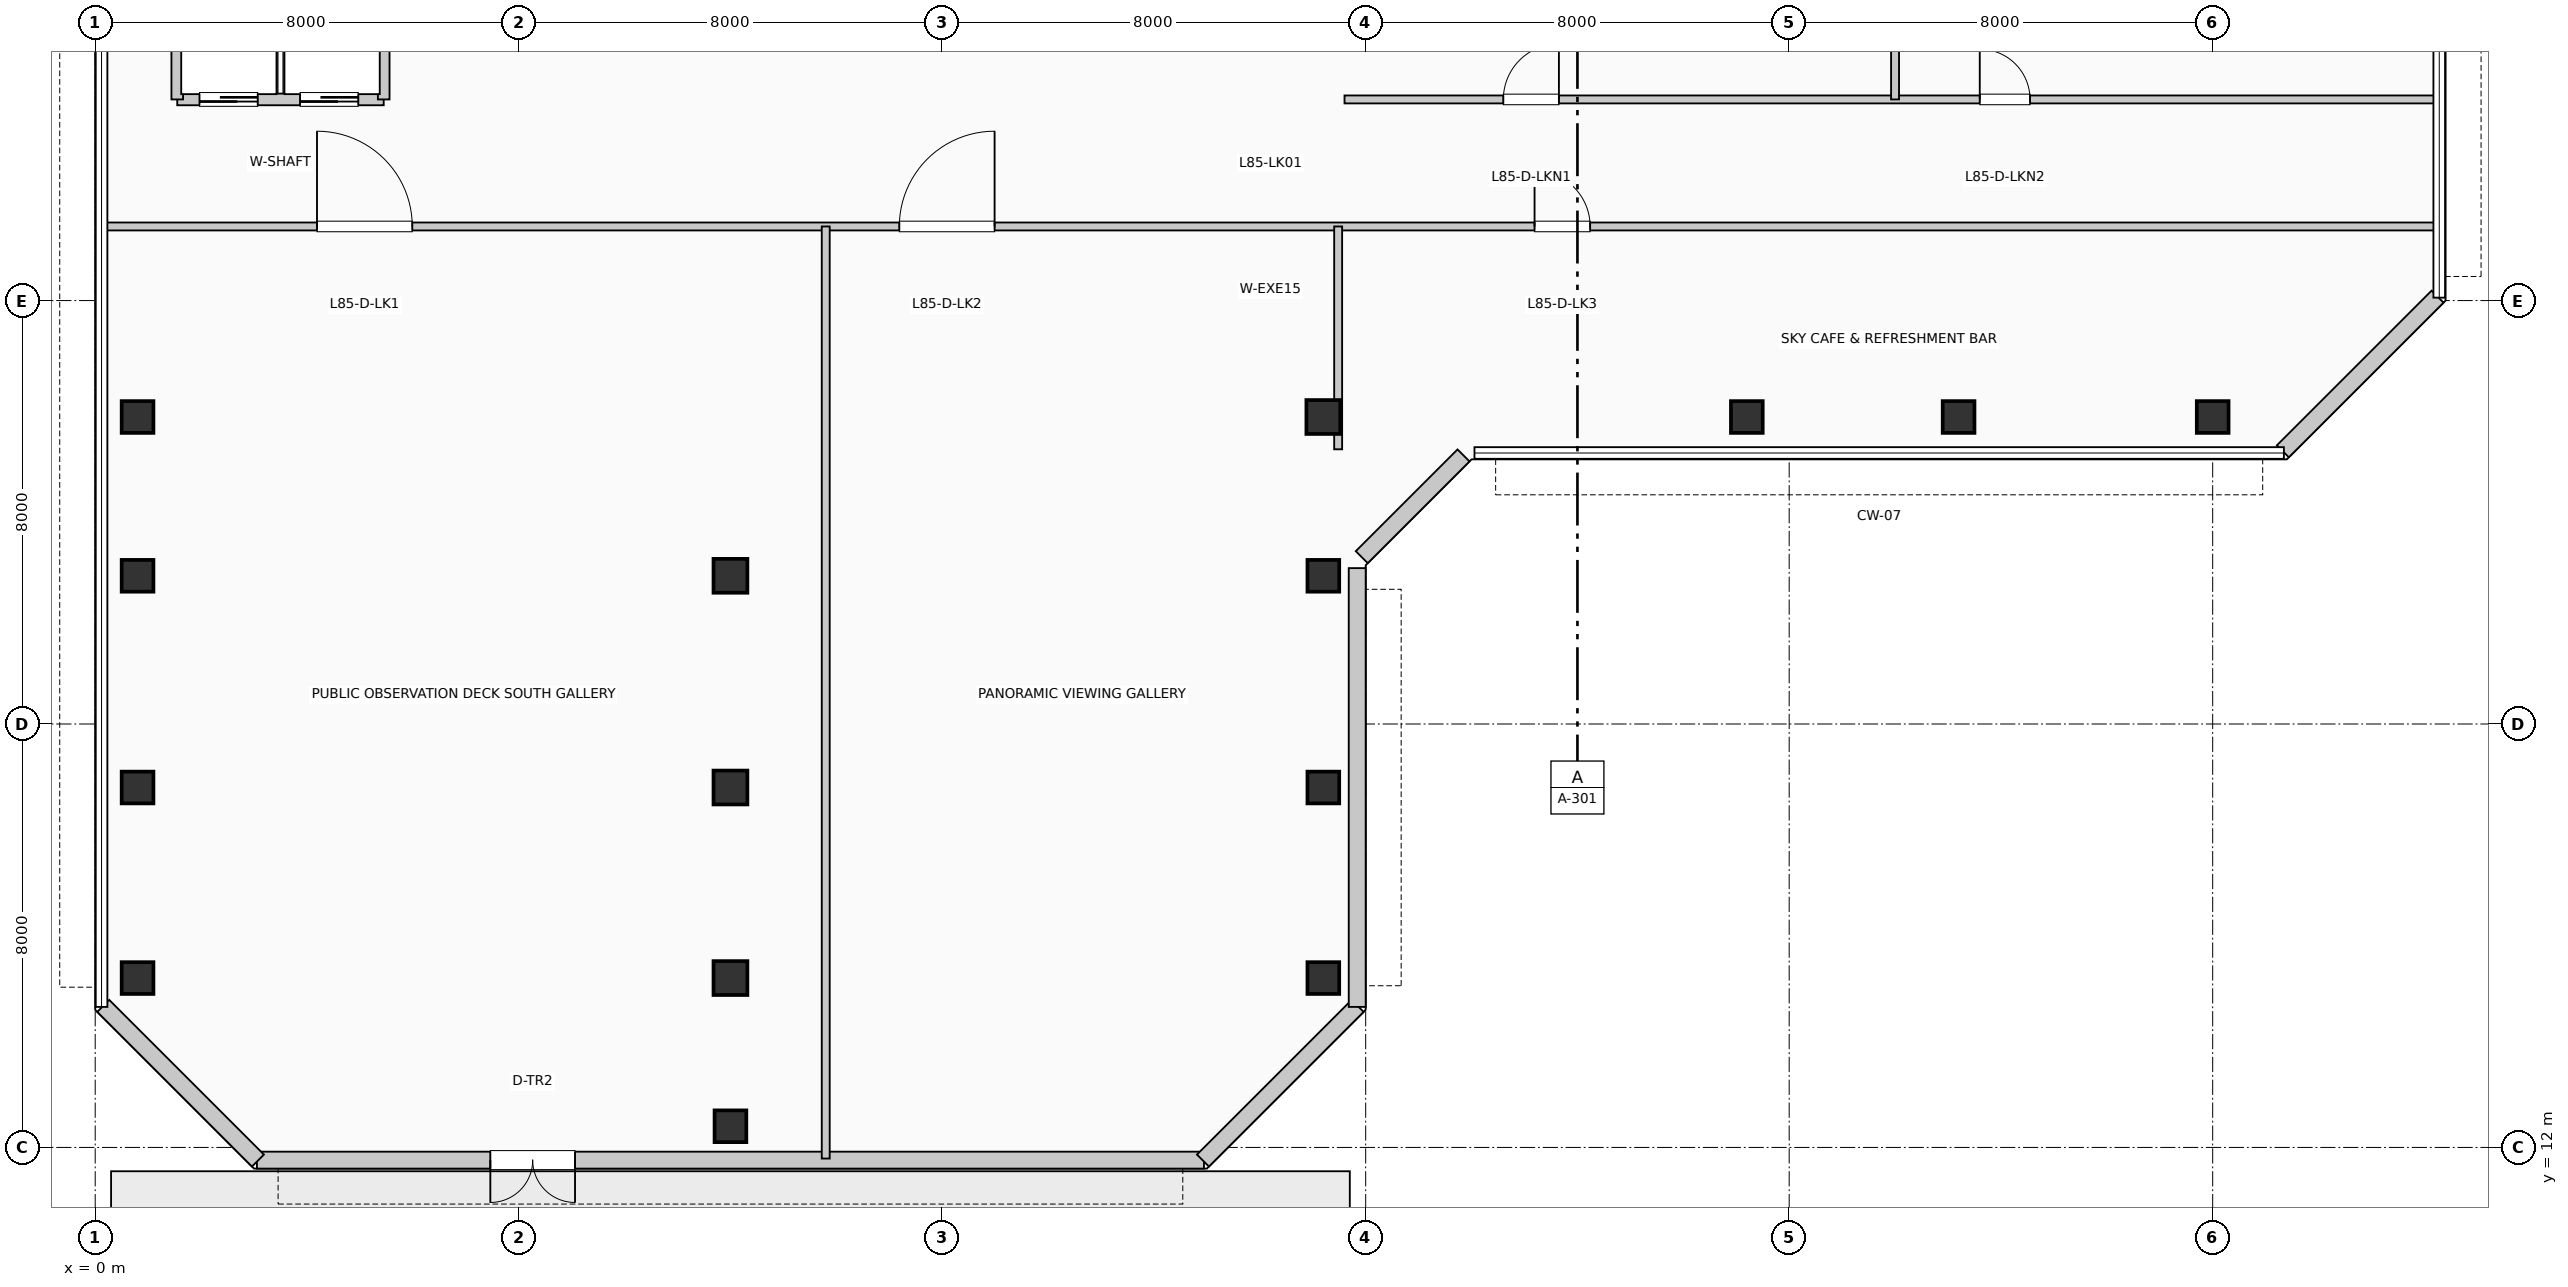
"""IFC4 building model, lengths in metres.
Left out: names, types, materials, properties, quantities, classifications, styles, units other than length and angle.
Written with IfcOpenShell. Run it as: python <this file> out.ifc"""

import sys

from ifc_helpers import new_model, si_unit, direction, frame, frame_2d, origin, origin_2d, place, context, subcontext, project, spatial, rectangle, extrude, element, fill, save


model = new_model("IFC4")
c1 = context("Model", 3, precision=1e-05, world=origin(), true_north=direction((0.0, 1.0)))
c2 = subcontext(c1, "Body", "Model", "MODEL_VIEW")
j1 = project(units=[si_unit("LENGTHUNIT", "METRE"), si_unit("PLANEANGLEUNIT", "RADIAN")], contexts=[c1])
p1 = place(None, origin())
s1 = spatial("IfcSite", under=j1, at=p1, CompositionType="ELEMENT")
p2 = place(p1, origin())
s2 = spatial("IfcBuilding", under=s1, at=p2, CompositionType="ELEMENT")
p3 = place(p2, frame((0.0, 0.0, 347.49)))
s3 = spatial("IfcBuildingStorey", under=s2, at=p3, CompositionType="ELEMENT", Elevation=347.49)
for number, where, z_axis, x_axis in (
    (1, (0.8, 15.2, 0.0), (0.0, 0.0, 1.0), (1.0, 0.0, 0.0)),
    (2, (0.8, 18.8, 0.0), (0.0, 0.0, 1.0), (1.0, 0.0, 0.0)),
    (3, (0.8, 22.8, 0.0), (0.0, 0.0, 1.0), (1.0, 0.0, 0.0)),
    (4, (0.8, 25.8, 0.0), (0.0, 0.0, 1.0), (1.0, 0.0, 0.0)),
    (5, (12.0, 12.4, 0.0), (0.0, 0.0, 1.0), (1.0, 0.0, 0.0)),
):
    element("IfcColumn", number, at=place(p3, frame(where, z_axis=z_axis, x_axis=x_axis)), inside=s3, PredefinedType="COLUMN", context=c2, shape_type="SweptSolid", body=[
        extrude(rectangle(XDim=0.6, YDim=0.6, at=origin_2d()), origin(), (0.0, 0.0, 1.0), 4.62),
    ])
for number, where, z_axis, x_axis in (
    (6, (12.0, 15.2, 0.0), (0.0, 0.0, 1.0), (1.0, 0.0, 0.0)),
    (7, (12.0, 18.8, 0.0), (0.0, 0.0, 1.0), (1.0, 0.0, 0.0)),
    (8, (12.0, 22.8, 0.0), (0.0, 0.0, 1.0), (1.0, 0.0, 0.0)),
):
    element("IfcColumn", number, at=place(p3, frame(where, z_axis=z_axis, x_axis=x_axis)), inside=s3, PredefinedType="COLUMN", context=c2, shape_type="SweptSolid", body=[
        extrude(rectangle(XDim=0.64, YDim=0.64, at=origin_2d()), origin(), (0.0, 0.0, 1.0), 4.62),
    ])
for number, where, z_axis, x_axis in (
    (9, (23.2, 15.2, 0.0), (0.0, 0.0, 1.0), (1.0, 0.0, 0.0)),
    (10, (23.2, 18.8, 0.0), (0.0, 0.0, 1.0), (1.0, 0.0, 0.0)),
    (11, (23.2, 22.8, 0.0), (0.0, 0.0, 1.0), (1.0, 0.0, 0.0)),
):
    element("IfcColumn", number, at=place(p3, frame(where, z_axis=z_axis, x_axis=x_axis)), inside=s3, PredefinedType="COLUMN", context=c2, shape_type="SweptSolid", body=[
        extrude(rectangle(XDim=0.6, YDim=0.6, at=origin_2d()), origin(), (0.0, 0.0, 1.0), 4.62),
    ])
p4 = place(p3, frame((23.2, 25.8, 0.0), z_axis=(0.0, 0.0, 1.0), x_axis=(1.0, 0.0, 0.0)))
e12 = element("IfcColumn", 12, at=p4, inside=s3, PredefinedType="COLUMN", context=c2, shape_type="SweptSolid", body=[
    extrude(rectangle(XDim=0.64, YDim=0.64, at=origin_2d()), origin(), (0.0, 0.0, 1.0), 4.62),
])
for number, where, z_axis, x_axis in (
    (13, (31.2, 25.8, 0.0), (0.0, 0.0, 1.0), (1.0, 0.0, 0.0)),
    (14, (35.2, 25.8, 0.0), (0.0, 0.0, 1.0), (1.0, 0.0, 0.0)),
    (15, (40.0, 25.8, 0.0), (0.0, 0.0, 1.0), (1.0, 0.0, 0.0)),
):
    element("IfcColumn", number, at=place(p3, frame(where, z_axis=z_axis, x_axis=x_axis)), inside=s3, PredefinedType="COLUMN", context=c2, shape_type="SweptSolid", body=[
        extrude(rectangle(XDim=0.6, YDim=0.6, at=origin_2d()), origin(), (0.0, 0.0, 1.0), 4.62),
    ])
p5 = place(p3, frame((3.055, 11.76, 0.0), z_axis=(0.0, 0.0, 1.0), x_axis=(1.0, 0.0, 0.0)))
e16 = element("IfcWall", 16, at=p5, inside=s3, PredefinedType="SOLIDWALL", context=c2, shape_type="SweptSolid", body=[
    extrude(rectangle(XDim=17.89, YDim=0.32, at=frame_2d((8.945, 0.0))), origin(), (0.0, 0.0, 1.0), 4.37),
])
p6 = place(p5, frame((6.009, 0.0, 0.0), z_axis=(0.0, 0.0, 1.0), x_axis=(-1.0, 0.0, 0.0)))
e17 = element("IfcOpeningElement", 17, at=p6, cuts=e16, PredefinedType="OPENING", context=c2, shape_type="SweptSolid", body=[
    extrude(rectangle(XDim=1.6, YDim=2.25, at=frame_2d((0.8, 1.125))), frame((0.0, 0.17, 0.0), z_axis=(0.0, -1.0, 0.0), x_axis=(1.0, 0.0, 0.0)), (0.0, 0.0, 1.0), 0.34),
])
p7 = place(p3, frame((20.926, 11.752, 0.0), z_axis=(0.0, 0.0, 1.0), x_axis=(0.707077242712, 0.707136318428, 0.0)))
e18 = element("IfcWall", 18, at=p7, inside=s3, PredefinedType="SOLIDWALL", context=c2, shape_type="SweptSolid", body=[
    extrude(rectangle(XDim=4.133, YDim=0.32, at=frame_2d((2.066, 0.0))), origin(), (0.0, 0.0, 1.0), 4.37),
])
p8 = place(p3, frame((23.84, 14.655, 0.0), z_axis=(0.0, 0.0, 1.0), x_axis=(0.0, 1.0, 0.0)))
e19 = element("IfcWall", 19, at=p8, inside=s3, PredefinedType="SOLIDWALL", context=c2, shape_type="SweptSolid", body=[
    extrude(rectangle(XDim=8.29, YDim=0.32, at=frame_2d((4.145, 0.0))), origin(), (0.0, 0.0, 1.0), 4.37),
])
p9 = place(p3, frame((23.926, 23.152, 0.0), z_axis=(0.0, 0.0, 1.0), x_axis=(0.707106781187, 0.707106781187, 0.0)))
e20 = element("IfcWall", 20, at=p9, inside=s3, PredefinedType="SOLIDWALL", context=c2, shape_type="SweptSolid", body=[
    extrude(rectangle(XDim=2.718, YDim=0.32, at=frame_2d((1.359, 0.0))), origin(), (0.0, 0.0, 1.0), 4.37),
])
for number, where, z_axis, x_axis in (
    (21, (41.326, 25.152, 0.0), (0.0, 0.0, 1.0), (0.707, 0.707, 0.0)),
    (22, (0.152, 14.674, 0.0), (0.0, 0.0, 1.0), (0.707, -0.707, 0.0)),
):
    element("IfcWall", number, at=place(p3, frame(where, z_axis=z_axis, x_axis=x_axis)), inside=s3, PredefinedType="SOLIDWALL", context=c2, shape_type="SweptSolid", body=[
        extrude(rectangle(XDim=4.133, YDim=0.32, at=frame_2d((2.066, 0.0))), origin(), (0.0, 0.0, 1.0), 4.37),
    ])
p10 = place(p3, frame((1.55, 31.8, 0.0), z_axis=(0.0, 0.0, 1.0), x_axis=(1.0, 0.0, 0.0)))
e23 = element("IfcWall", 23, at=p10, inside=s3, PredefinedType="PARTITIONING", context=c2, shape_type="SweptSolid", body=[
    extrude(rectangle(XDim=3.9, YDim=0.22, at=frame_2d((1.95, 0.0))), origin(), (0.0, 0.0, 1.0), 4.37),
])
p11 = place(p10, frame((1.52, 0.0, 0.0), z_axis=(0.0, 0.0, 1.0), x_axis=(-1.0, 0.0, 0.0)))
e24 = element("IfcOpeningElement", 24, at=p11, cuts=e23, PredefinedType="OPENING", context=c2, shape_type="SweptSolid", body=[
    extrude(rectangle(XDim=1.1, YDim=2.2, at=frame_2d((0.55, 1.1))), frame((0.0, 0.12, 0.0), z_axis=(0.0, -1.0, 0.0), x_axis=(1.0, 0.0, 0.0)), (0.0, 0.0, 1.0), 0.24),
])
p12 = place(p10, frame((3.42, 0.0, 0.0), z_axis=(0.0, 0.0, 1.0), x_axis=(-1.0, 0.0, 0.0)))
e25 = element("IfcOpeningElement", 25, at=p12, cuts=e23, PredefinedType="OPENING", context=c2, shape_type="SweptSolid", body=[
    extrude(rectangle(XDim=1.1, YDim=2.2, at=frame_2d((0.55, 1.1))), frame((0.0, 0.12, 0.0), z_axis=(0.0, -1.0, 0.0), x_axis=(1.0, 0.0, 0.0)), (0.0, 0.0, 1.0), 0.24),
])
for number, where, z_axis, x_axis in (
    (26, (1.55, 31.8, 0.0), (0.0, 0.0, 1.0), (0.0, 1.0, 0.0)),
    (27, (5.45, 31.8, 0.0), (0.0, 0.0, 1.0), (0.0, 1.0, 0.0)),
):
    element("IfcWall", number, at=place(p3, frame(where, z_axis=z_axis, x_axis=x_axis)), inside=s3, PredefinedType="PARTITIONING", context=c2, shape_type="SweptSolid", body=[
        extrude(rectangle(XDim=2.38, YDim=0.22, at=frame_2d((1.19, 0.0))), origin(), (0.0, 0.0, 1.0), 4.37),
    ])
p13 = place(p3, frame((0.19, 29.4, 0.0), z_axis=(0.0, 0.0, 1.0), x_axis=(1.0, 0.0, 0.0)))
e28 = element("IfcWall", 28, at=p13, inside=s3, PredefinedType="PARTITIONING", context=c2, shape_type="SweptSolid", body=[
    extrude(rectangle(XDim=44.02, YDim=0.15, at=frame_2d((22.01, 0.0))), origin(), (0.0, 0.0, 1.0), 4.055),
])
p14 = place(p13, frame((4.0, 0.0, 0.0)))
e29 = element("IfcOpeningElement", 29, at=p14, cuts=e28, PredefinedType="OPENING", context=c2, shape_type="SweptSolid", body=[
    extrude(rectangle(XDim=1.8, YDim=2.3, at=frame_2d((0.9, 1.15))), frame((0.0, 0.085, 0.0), z_axis=(0.0, -1.0, 0.0), x_axis=(1.0, 0.0, 0.0)), (0.0, 0.0, 1.0), 0.17),
])
p15 = place(p13, frame((15.0, 0.0, 0.0)))
e30 = element("IfcOpeningElement", 30, at=p15, cuts=e28, PredefinedType="OPENING", context=c2, shape_type="SweptSolid", body=[
    extrude(rectangle(XDim=1.8, YDim=2.3, at=frame_2d((0.9, 1.15))), frame((0.0, 0.085, 0.0), z_axis=(0.0, -1.0, 0.0), x_axis=(1.0, 0.0, 0.0)), (0.0, 0.0, 1.0), 0.17),
])
p16 = place(p13, frame((27.0, 0.0, 0.0)))
e31 = element("IfcOpeningElement", 31, at=p16, cuts=e28, PredefinedType="OPENING", context=c2, shape_type="SweptSolid", body=[
    extrude(rectangle(XDim=1.05, YDim=2.15, at=frame_2d((0.525, 1.075))), frame((0.0, 0.085, 0.0), z_axis=(0.0, -1.0, 0.0), x_axis=(1.0, 0.0, 0.0)), (0.0, 0.0, 1.0), 0.17),
])
p17 = place(p3, frame((23.6, 31.8, 0.0), z_axis=(0.0, 0.0, 1.0), x_axis=(1.0, 0.0, 0.0)))
e32 = element("IfcWall", 32, at=p17, inside=s3, PredefinedType="PARTITIONING", context=c2, shape_type="SweptSolid", body=[
    extrude(rectangle(XDim=20.61, YDim=0.15, at=frame_2d((10.305, 0.0))), origin(), (0.0, 0.0, 1.0), 4.37),
])
p18 = place(p17, frame((3.0, 0.0, 0.0)))
e33 = element("IfcOpeningElement", 33, at=p18, cuts=e32, PredefinedType="OPENING", context=c2, shape_type="SweptSolid", body=[
    extrude(rectangle(XDim=1.05, YDim=2.15, at=frame_2d((0.525, 1.075))), frame((0.0, 0.085, 0.0), z_axis=(0.0, -1.0, 0.0), x_axis=(1.0, 0.0, 0.0)), (0.0, 0.0, 1.0), 0.17),
])
p19 = place(p17, frame((12.0, 0.0, 0.0)))
e34 = element("IfcOpeningElement", 34, at=p19, cuts=e32, PredefinedType="OPENING", context=c2, shape_type="SweptSolid", body=[
    extrude(rectangle(XDim=0.95, YDim=2.15, at=frame_2d((0.475, 1.075))), frame((0.0, 0.085, 0.0), z_axis=(0.0, -1.0, 0.0), x_axis=(1.0, 0.0, 0.0)), (0.0, 0.0, 1.0), 0.17),
])
p20 = place(p3, frame((13.8, 11.79, 0.0), z_axis=(0.0, 0.0, 1.0), x_axis=(0.0, 1.0, 0.0)))
e35 = element("IfcWall", 35, at=p20, inside=s3, PredefinedType="PARTITIONING", context=c2, shape_type="SweptSolid", body=[
    extrude(rectangle(XDim=17.61, YDim=0.15, at=frame_2d((8.805, 0.0))), origin(), (0.0, 0.0, 1.0), 4.37),
])
p21 = place(p3, frame((23.48, 25.19, 0.0), z_axis=(0.0, 0.0, 1.0), x_axis=(0.0, 1.0, 0.0)))
e36 = element("IfcWall", 36, at=p21, inside=s3, PredefinedType="PARTITIONING", context=c2, shape_type="SweptSolid", body=[
    extrude(rectangle(XDim=4.21, YDim=0.15, at=frame_2d((2.105, 0.0))), origin(), (0.0, 0.0, 1.0), 3.855),
])
p22 = place(p3, frame((34.0, 31.8, 0.0), z_axis=(0.0, 0.0, 1.0), x_axis=(0.0, 1.0, 0.0)))
e37 = element("IfcWall", 37, at=p22, inside=s3, PredefinedType="PARTITIONING", context=c2, shape_type="SweptSolid", body=[
    extrude(rectangle(XDim=14.01, YDim=0.15, at=frame_2d((7.005, 0.0))), origin(), (0.0, 0.0, 1.0), 4.37),
])
p23 = place(p6, origin())
e38 = element("IfcDoor", 38, at=p23, inside=s3, OperationType="DOUBLE_DOOR_SINGLE_SWING", PredefinedType="DOOR", context=c2, shape_type="SweptSolid", body=[
    extrude(rectangle(XDim=1.6, YDim=2.25, at=frame_2d((0.8, 1.125))), frame((0.0, 0.025, 0.0), z_axis=(0.0, -1.0, 0.0), x_axis=(1.0, 0.0, 0.0)), (0.0, 0.0, 1.0), 0.05),
])
fill(e17, e38)
p24 = place(p11, origin())
e39 = element("IfcDoor", 39, at=p24, inside=s3, OperationType="SLIDING_TO_LEFT", PredefinedType="DOOR", context=c2, shape_type="SweptSolid", body=[
    extrude(rectangle(XDim=1.1, YDim=2.2, at=frame_2d((0.55, 1.1))), frame((0.0, 0.025, 0.0), z_axis=(0.0, -1.0, 0.0), x_axis=(1.0, 0.0, 0.0)), (0.0, 0.0, 1.0), 0.05),
])
fill(e24, e39)
p25 = place(p12, origin())
e40 = element("IfcDoor", 40, at=p25, inside=s3, OperationType="SLIDING_TO_LEFT", PredefinedType="DOOR", context=c2, shape_type="SweptSolid", body=[
    extrude(rectangle(XDim=1.1, YDim=2.2, at=frame_2d((0.55, 1.1))), frame((0.0, 0.025, 0.0), z_axis=(0.0, -1.0, 0.0), x_axis=(1.0, 0.0, 0.0)), (0.0, 0.0, 1.0), 0.05),
])
fill(e25, e40)
p26 = place(p14, origin())
e41 = element("IfcDoor", 41, at=p26, inside=s3, OperationType="SINGLE_SWING_LEFT", PredefinedType="DOOR", context=c2, shape_type="SweptSolid", body=[
    extrude(rectangle(XDim=1.8, YDim=2.3, at=frame_2d((0.9, 1.15))), frame((0.0, 0.025, 0.0), z_axis=(0.0, -1.0, 0.0), x_axis=(1.0, 0.0, 0.0)), (0.0, 0.0, 1.0), 0.05),
])
fill(e29, e41)
p27 = place(p15, origin())
e42 = element("IfcDoor", 42, at=p27, inside=s3, OperationType="SINGLE_SWING_RIGHT", PredefinedType="DOOR", context=c2, shape_type="SweptSolid", body=[
    extrude(rectangle(XDim=1.8, YDim=2.3, at=frame_2d((0.9, 1.15))), frame((0.0, 0.025, 0.0), z_axis=(0.0, -1.0, 0.0), x_axis=(1.0, 0.0, 0.0)), (0.0, 0.0, 1.0), 0.05),
])
fill(e30, e42)
p28 = place(p16, origin())
e43 = element("IfcDoor", 43, at=p28, inside=s3, OperationType="SINGLE_SWING_LEFT", PredefinedType="DOOR", context=c2, shape_type="SweptSolid", body=[
    extrude(rectangle(XDim=1.05, YDim=2.15, at=frame_2d((0.525, 1.075))), frame((0.0, 0.025, 0.0), z_axis=(0.0, -1.0, 0.0), x_axis=(1.0, 0.0, 0.0)), (0.0, 0.0, 1.0), 0.05),
])
fill(e31, e43)
p29 = place(p18, origin())
e44 = element("IfcDoor", 44, at=p29, inside=s3, OperationType="SINGLE_SWING_RIGHT", PredefinedType="DOOR", context=c2, shape_type="SweptSolid", body=[
    extrude(rectangle(XDim=1.05, YDim=2.15, at=frame_2d((0.525, 1.075))), frame((0.0, 0.025, 0.0), z_axis=(0.0, -1.0, 0.0), x_axis=(1.0, 0.0, 0.0)), (0.0, 0.0, 1.0), 0.05),
])
fill(e33, e44)
p30 = place(p19, origin())
e45 = element("IfcDoor", 45, at=p30, inside=s3, OperationType="SINGLE_SWING_LEFT", PredefinedType="DOOR", context=c2, shape_type="SweptSolid", body=[
    extrude(rectangle(XDim=0.95, YDim=2.15, at=frame_2d((0.475, 1.075))), frame((0.0, 0.025, 0.0), z_axis=(0.0, -1.0, 0.0), x_axis=(1.0, 0.0, 0.0)), (0.0, 0.0, 1.0), 0.05),
])
fill(e34, e45)
save(model, sys.argv[1])
